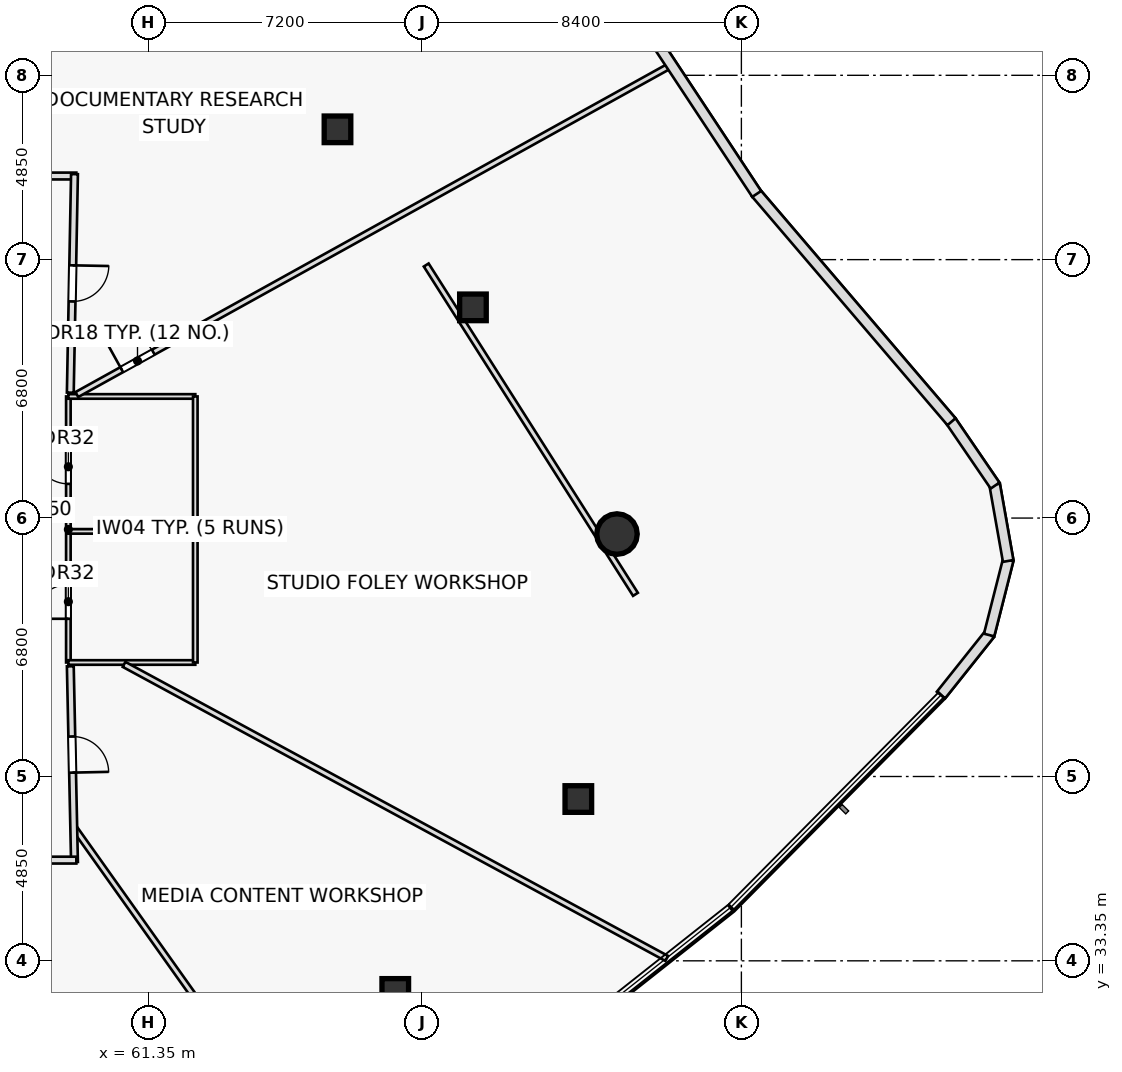
"""IFC4 building model, lengths in metres.
Left out: names, types, materials, properties, quantities, classifications, styles, units other than length and angle.
Written with IfcOpenShell. Run it as: python <this file> out.ifc"""

import sys

from ifc_helpers import new_model, si_unit, direction, frame, frame_2d, origin, origin_2d, place, context, subcontext, project, spatial, rectangle, hollow_rectangle, hollow_circle, extrude, element, fill, save


model = new_model("IFC4")
c1 = context("Model", 3, precision=1e-05, world=origin(), true_north=direction((0.0, 1.0)))
c2 = subcontext(c1, "Body", "Model", "MODEL_VIEW")
j1 = project(units=[si_unit("LENGTHUNIT", "METRE"), si_unit("PLANEANGLEUNIT", "RADIAN")], contexts=[c1])
p1 = place(None, origin())
s1 = spatial("IfcSite", under=j1, at=p1, CompositionType="ELEMENT")
p2 = place(p1, origin())
s2 = spatial("IfcBuilding", under=s1, at=p2, CompositionType="ELEMENT")
p3 = place(p2, frame((0.0, 0.0, 150.25)))
s3 = spatial("IfcBuildingStorey", under=s2, at=p3, CompositionType="ELEMENT", Elevation=150.25)
for number, where, z_axis, x_axis in (
    (1, (67.842, 32.532, 0.0), (0.0, 0.0, 1.0), (1.0, 0.0, 0.0)),
    (2, (72.659, 37.607, 0.0), (0.0, 0.0, 1.0), (1.0, 0.0, 0.0)),
):
    element("IfcColumn", number, at=place(p3, frame(where, z_axis=z_axis, x_axis=x_axis)), inside=s3, PredefinedType="COLUMN", context=c2, shape_type="SweptSolid", body=[
        extrude(hollow_rectangle(XDim=0.7, YDim=0.7, WallThickness=0.04, at=origin_2d()), origin(), (0.0, 0.0, 1.0), 3.55),
    ])
p4 = place(p3, frame((73.676, 44.58, 0.0), z_axis=(0.0, 0.0, 1.0), x_axis=(1.0, 0.0, 0.0)))
e3 = element("IfcColumn", 3, at=p4, inside=s3, PredefinedType="COLUMN", context=c2, shape_type="SweptSolid", body=[
    extrude(hollow_circle(Radius=0.533, WallThickness=0.045, at=origin_2d()), origin(), (0.0, 0.0, 1.0), 3.55),
])
for number, where, z_axis, x_axis in (
    (4, (69.886, 50.544, 0.0), (0.0, 0.0, 1.0), (1.0, 0.0, 0.0)),
    (5, (66.322, 55.229, 0.0), (0.0, 0.0, 1.0), (1.0, 0.0, 0.0)),
):
    element("IfcColumn", number, at=place(p3, frame(where, z_axis=z_axis, x_axis=x_axis)), inside=s3, PredefinedType="COLUMN", context=c2, shape_type="SweptSolid", body=[
        extrude(hollow_rectangle(XDim=0.7, YDim=0.7, WallThickness=0.04, at=origin_2d()), origin(), (0.0, 0.0, 1.0), 3.55),
    ])
p5 = place(p3, frame((74.163, 42.993, 0.0), z_axis=(0.0, 0.0, 1.0), x_axis=(-0.53628142437, 0.844039237166, 0.0)))
e6 = element("IfcWall", 6, at=p5, inside=s3, PredefinedType="PARTITIONING", context=c2, shape_type="SweptSolid", body=[
    extrude(rectangle(XDim=10.267, YDim=0.15, at=frame_2d((5.133, 0.0))), origin(), (0.0, 0.0, 1.0), 2.835),
])
p6 = place(p3, frame((59.24, 41.2, 0.0), z_axis=(0.0, 0.0, 1.0), x_axis=(0.0, 1.0, 0.0)))
e7 = element("IfcWall", 7, at=p6, inside=s3, PredefinedType="PARTITIONING", context=c2, shape_type="SweptSolid", body=[
    extrude(rectangle(XDim=7.0, YDim=0.12, at=frame_2d((3.5, 0.0))), origin(), (0.0, 0.0, 1.0), 3.55),
])
p7 = place(p6, frame((1.15, 0.0, 0.0)))
e8 = element("IfcOpeningElement", 8, at=p7, cuts=e7, PredefinedType="OPENING", context=c2, shape_type="SweptSolid", body=[
    extrude(rectangle(XDim=0.9, YDim=2.05, at=frame_2d((0.45, 1.025))), frame((0.0, 0.07, 0.0), z_axis=(0.0, -1.0, 0.0), x_axis=(1.0, 0.0, 0.0)), (0.0, 0.0, 1.0), 0.14),
])
p8 = place(p6, frame((4.7, 0.0, 0.0)))
e9 = element("IfcOpeningElement", 9, at=p8, cuts=e7, PredefinedType="OPENING", context=c2, shape_type="SweptSolid", body=[
    extrude(rectangle(XDim=0.9, YDim=2.05, at=frame_2d((0.45, 1.025))), frame((0.0, 0.07, 0.0), z_axis=(0.0, -1.0, 0.0), x_axis=(1.0, 0.0, 0.0)), (0.0, 0.0, 1.0), 0.14),
])
for number, where, z_axis, x_axis in (
    (10, (59.24, 41.2, 0.0), (0.0, 0.0, 1.0), (1.0, 0.0, 0.0)),
    (11, (59.24, 44.65, 0.0), (0.0, 0.0, 1.0), (1.0, 0.0, 0.0)),
    (12, (59.24, 48.2, 0.0), (0.0, 0.0, 1.0), (1.0, 0.0, 0.0)),
):
    element("IfcWall", number, at=place(p3, frame(where, z_axis=z_axis, x_axis=x_axis)), inside=s3, PredefinedType="PARTITIONING", context=c2, shape_type="SweptSolid", body=[
        extrude(rectangle(XDim=3.34, YDim=0.12, at=frame_2d((1.67, 0.0))), origin(), (0.0, 0.0, 1.0), 3.55),
    ])
p9 = place(p3, frame((62.58, 41.2, 0.0), z_axis=(0.0, 0.0, 1.0), x_axis=(0.0, 1.0, 0.0)))
e13 = element("IfcWall", 13, at=p9, inside=s3, PredefinedType="PARTITIONING", context=c2, shape_type="SweptSolid", body=[
    extrude(rectangle(XDim=7.0, YDim=0.12, at=frame_2d((3.5, 0.0))), origin(), (0.0, 0.0, 1.0), 3.55),
])
p10 = place(p3, frame((59.463, 48.25, 0.0), z_axis=(0.0, 0.0, 1.0), x_axis=(0.87461815062, 0.48481242827, 0.0)))
e14 = element("IfcWall", 14, at=p10, inside=s3, PredefinedType="PARTITIONING", context=c2, shape_type="SweptSolid", body=[
    extrude(rectangle(XDim=17.901, YDim=0.15, at=frame_2d((8.95, 0.0))), origin(), (0.0, 0.0, 1.0), 2.835),
])
p11 = place(p10, frame((1.35, 0.0, 0.0)))
e15 = element("IfcOpeningElement", 15, at=p11, cuts=e14, PredefinedType="OPENING", context=c2, shape_type="SweptSolid", body=[
    extrude(rectangle(XDim=0.95, YDim=2.05, at=frame_2d((0.475, 1.025))), frame((0.0, 0.085, 0.0), z_axis=(0.0, -1.0, 0.0), x_axis=(1.0, 0.0, 0.0)), (0.0, 0.0, 1.0), 0.17),
])
p12 = place(p3, frame((56.874, 54.0, 0.0), z_axis=(0.0, 0.0, 1.0), x_axis=(0.341852479972, 0.939753628318, 0.0)))
e16 = element("IfcWall", 16, at=p12, inside=s3, PredefinedType="PARTITIONING", context=c2, shape_type="SweptSolid", body=[
    extrude(rectangle(XDim=14.511, YDim=0.15, at=frame_2d((7.256, 0.0))), origin(), (0.0, 0.0, 1.0), 2.835),
])
p13 = place(p3, frame((56.625, 36.0, 0.0), z_axis=(0.0, 0.0, 1.0), x_axis=(0.318583516761, -0.947894795243, 0.0)))
e17 = element("IfcWall", 17, at=p13, inside=s3, PredefinedType="PARTITIONING", context=c2, shape_type="SweptSolid", body=[
    extrude(rectangle(XDim=12.338, YDim=0.15, at=frame_2d((6.169, 0.0))), origin(), (0.0, 0.0, 1.0), 2.835),
])
p14 = place(p3, frame((59.381, 36.869, 0.0), z_axis=(0.0, 0.0, 1.0), x_axis=(0.579466969075, -0.814995724989, 0.0)))
e18 = element("IfcWall", 18, at=p14, inside=s3, PredefinedType="PARTITIONING", context=c2, shape_type="SweptSolid", body=[
    extrude(rectangle(XDim=11.796, YDim=0.15, at=frame_2d((5.898, 0.0))), origin(), (0.0, 0.0, 1.0), 2.975),
])
p15 = place(p3, frame((60.706, 41.15, 0.0), z_axis=(0.0, 0.0, 1.0), x_axis=(0.879232941784, -0.476392101195, 0.0)))
e19 = element("IfcWall", 19, at=p15, inside=s3, PredefinedType="PARTITIONING", context=c2, shape_type="SweptSolid", body=[
    extrude(rectangle(XDim=16.241, YDim=0.15, at=frame_2d((8.121, 0.0))), origin(), (0.0, 0.0, 1.0), 2.835),
])
p16 = place(p3, frame((54.3, 54.0, 0.0), z_axis=(0.0, 0.0, 1.0), x_axis=(1.0, 0.0, 0.0)))
e20 = element("IfcWall", 20, at=p16, inside=s3, PredefinedType="PARTITIONING", context=c2, shape_type="SweptSolid", body=[
    extrude(rectangle(XDim=5.15, YDim=0.18, at=frame_2d((2.575, 0.0))), origin(), (0.0, 0.0, 1.0), 2.835),
])
p17 = place(p16, frame((1.033, 0.0, 0.0)))
e21 = element("IfcOpeningElement", 21, at=p17, cuts=e20, PredefinedType="OPENING", context=c2, shape_type="SweptSolid", body=[
    extrude(rectangle(XDim=0.95, YDim=2.05, at=frame_2d((0.475, 1.025))), frame((0.0, 0.1, 0.0), z_axis=(0.0, -1.0, 0.0), x_axis=(1.0, 0.0, 0.0)), (0.0, 0.0, 1.0), 0.2),
])
p18 = place(p3, frame((59.401, 54.05, 0.0), z_axis=(0.0, 0.0, 1.0), x_axis=(-0.019103170983, -0.999817517779, 0.0)))
e22 = element("IfcWall", 22, at=p18, inside=s3, PredefinedType="PARTITIONING", context=c2, shape_type="SweptSolid", body=[
    extrude(rectangle(XDim=5.751, YDim=0.18, at=frame_2d((2.875, 0.0))), origin(), (0.0, 0.0, 1.0), 2.835),
])
p19 = place(p18, frame((2.4, 0.0, 0.0)))
e23 = element("IfcOpeningElement", 23, at=p19, cuts=e22, PredefinedType="OPENING", context=c2, shape_type="SweptSolid", body=[
    extrude(rectangle(XDim=0.95, YDim=2.05, at=frame_2d((0.475, 1.025))), frame((0.0, 0.1, 0.0), z_axis=(0.0, -1.0, 0.0), x_axis=(1.0, 0.0, 0.0)), (0.0, 0.0, 1.0), 0.2),
])
p20 = place(p3, frame((59.291, 41.1, 0.0), z_axis=(0.0, 0.0, 1.0), x_axis=(0.021374589398, -0.999771537366, 0.0)))
e24 = element("IfcWall", 24, at=p20, inside=s3, PredefinedType="PARTITIONING", context=c2, shape_type="SweptSolid", body=[
    extrude(rectangle(XDim=5.151, YDim=0.18, at=frame_2d((2.576, 0.0))), origin(), (0.0, 0.0, 1.0), 2.835),
])
p21 = place(p20, frame((1.849, 0.0, 0.0)))
e25 = element("IfcOpeningElement", 25, at=p21, cuts=e24, PredefinedType="OPENING", context=c2, shape_type="SweptSolid", body=[
    extrude(rectangle(XDim=0.95, YDim=2.05, at=frame_2d((0.475, 1.025))), frame((0.0, 0.1, 0.0), z_axis=(0.0, -1.0, 0.0), x_axis=(1.0, 0.0, 0.0)), (0.0, 0.0, 1.0), 0.2),
])
p22 = place(p3, frame((59.45, 36.0, 0.0), z_axis=(0.0, 0.0, 1.0), x_axis=(-1.0, 0.0, 0.0)))
e26 = element("IfcWall", 26, at=p22, inside=s3, PredefinedType="PARTITIONING", context=c2, shape_type="SweptSolid", body=[
    extrude(rectangle(XDim=19.7, YDim=0.18, at=frame_2d((9.85, 0.0))), origin(), (0.0, 0.0, 1.0), 2.835),
])
p23 = place(p22, frame((1.035, 0.0, 0.0)))
e27 = element("IfcOpeningElement", 27, at=p23, cuts=e26, PredefinedType="OPENING", context=c2, shape_type="SweptSolid", body=[
    extrude(rectangle(XDim=0.95, YDim=2.05, at=frame_2d((0.475, 1.025))), frame((0.0, 0.1, 0.0), z_axis=(0.0, -1.0, 0.0), x_axis=(1.0, 0.0, 0.0)), (0.0, 0.0, 1.0), 0.2),
])
p24 = place(p22, frame((5.885, 0.0, 0.0)))
e28 = element("IfcOpeningElement", 28, at=p24, cuts=e26, PredefinedType="OPENING", context=c2, shape_type="SweptSolid", body=[
    extrude(rectangle(XDim=0.95, YDim=2.05, at=frame_2d((0.475, 1.025))), frame((0.0, 0.1, 0.0), z_axis=(0.0, -1.0, 0.0), x_axis=(1.0, 0.0, 0.0)), (0.0, 0.0, 1.0), 0.2),
])
p25 = place(p22, frame((10.567, 0.0, 0.0)))
e29 = element("IfcOpeningElement", 29, at=p25, cuts=e26, PredefinedType="OPENING", context=c2, shape_type="SweptSolid", body=[
    extrude(rectangle(XDim=0.95, YDim=2.05, at=frame_2d((0.475, 1.025))), frame((0.0, 0.1, 0.0), z_axis=(0.0, -1.0, 0.0), x_axis=(1.0, 0.0, 0.0)), (0.0, 0.0, 1.0), 0.2),
])
p26 = place(p22, frame((15.343, 0.0, 0.0)))
e30 = element("IfcOpeningElement", 30, at=p26, cuts=e26, PredefinedType="OPENING", context=c2, shape_type="SweptSolid", body=[
    extrude(rectangle(XDim=0.95, YDim=2.05, at=frame_2d((0.475, 1.025))), frame((0.0, 0.1, 0.0), z_axis=(0.0, -1.0, 0.0), x_axis=(1.0, 0.0, 0.0)), (0.0, 0.0, 1.0), 0.2),
])
p27 = place(p3, frame((82.203, 40.343, 0.0), z_axis=(0.0, 0.0, 1.0), x_axis=(0.623127560827, 0.782120222816, 0.0)))
e31 = element("IfcWall", 31, at=p27, inside=s3, PredefinedType="STANDARD", context=c2, shape_type="SweptSolid", body=[
    extrude(rectangle(XDim=2.053, YDim=0.28, at=frame_2d((1.026, 0.0))), origin(), (0.0, 0.0, 1.0), 3.55),
])
p28 = place(p3, frame((83.469, 41.922, 0.0), z_axis=(0.0, 0.0, 1.0), x_axis=(0.246136012323, 0.969235298283, 0.0)))
e32 = element("IfcWall", 32, at=p28, inside=s3, PredefinedType="STANDARD", context=c2, shape_type="SweptSolid", body=[
    extrude(rectangle(XDim=2.041, YDim=0.28, at=frame_2d((1.021, 0.0))), origin(), (0.0, 0.0, 1.0), 3.55),
])
p29 = place(p3, frame((83.97, 43.872, 0.0), z_axis=(0.0, 0.0, 1.0), x_axis=(-0.17447430883, 0.984661726462, 0.0)))
e33 = element("IfcWall", 33, at=p29, inside=s3, PredefinedType="STANDARD", context=c2, shape_type="SweptSolid", body=[
    extrude(rectangle(XDim=2.042, YDim=0.28, at=frame_2d((1.021, 0.0))), origin(), (0.0, 0.0, 1.0), 3.55),
])
p30 = place(p3, frame((83.625, 45.854, 0.0), z_axis=(0.0, 0.0, 1.0), x_axis=(-0.564217382492, 0.82562627459, 0.0)))
e34 = element("IfcWall", 34, at=p30, inside=s3, PredefinedType="STANDARD", context=c2, shape_type="SweptSolid", body=[
    extrude(rectangle(XDim=2.064, YDim=0.28, at=frame_2d((1.032, 0.0))), origin(), (0.0, 0.0, 1.0), 3.55),
])
p31 = place(p3, frame((82.479, 47.535, 0.0), z_axis=(0.0, 0.0, 1.0), x_axis=(-0.649762180693, 0.76013755896, 0.0)))
e35 = element("IfcWall", 35, at=p31, inside=s3, PredefinedType="STANDARD", context=c2, shape_type="SweptSolid", body=[
    extrude(rectangle(XDim=7.917, YDim=0.28, at=frame_2d((3.958, 0.0))), origin(), (0.0, 0.0, 1.0), 3.55),
])
p32 = place(p3, frame((77.353, 53.529, 0.0), z_axis=(0.0, 0.0, 1.0), x_axis=(-0.551124772076, 0.834422845807, 0.0)))
e36 = element("IfcWall", 36, at=p32, inside=s3, PredefinedType="STANDARD", context=c2, shape_type="SweptSolid", body=[
    extrude(rectangle(XDim=8.521, YDim=0.28, at=frame_2d((4.261, 0.0))), origin(), (0.0, 0.0, 1.0), 3.55),
])
p33 = place(p7, origin())
e37 = element("IfcDoor", 37, at=p33, inside=s3, OperationType="SINGLE_SWING_LEFT", PredefinedType="DOOR", context=c2, shape_type="SweptSolid", body=[
    extrude(rectangle(XDim=0.9, YDim=2.05, at=frame_2d((0.45, 1.025))), frame((0.0, 0.025, 0.0), z_axis=(0.0, -1.0, 0.0), x_axis=(1.0, 0.0, 0.0)), (0.0, 0.0, 1.0), 0.05),
])
fill(e8, e37)
p34 = place(p8, origin())
e38 = element("IfcDoor", 38, at=p34, inside=s3, OperationType="SINGLE_SWING_RIGHT", PredefinedType="DOOR", context=c2, shape_type="SweptSolid", body=[
    extrude(rectangle(XDim=0.9, YDim=2.05, at=frame_2d((0.45, 1.025))), frame((0.0, 0.025, 0.0), z_axis=(0.0, -1.0, 0.0), x_axis=(1.0, 0.0, 0.0)), (0.0, 0.0, 1.0), 0.05),
])
fill(e9, e38)
p35 = place(p11, origin())
e39 = element("IfcDoor", 39, at=p35, inside=s3, OperationType="SINGLE_SWING_LEFT", PredefinedType="DOOR", context=c2, shape_type="SweptSolid", body=[
    extrude(rectangle(XDim=0.95, YDim=2.05, at=frame_2d((0.475, 1.025))), frame((0.0, 0.025, 0.0), z_axis=(0.0, -1.0, 0.0), x_axis=(1.0, 0.0, 0.0)), (0.0, 0.0, 1.0), 0.05),
])
fill(e15, e39)
p36 = place(p19, origin())
e40 = element("IfcDoor", 40, at=p36, inside=s3, OperationType="SINGLE_SWING_LEFT", PredefinedType="DOOR", context=c2, shape_type="SweptSolid", body=[
    extrude(rectangle(XDim=0.95, YDim=2.05, at=frame_2d((0.475, 1.025))), frame((0.0, 0.025, 0.0), z_axis=(0.0, -1.0, 0.0), x_axis=(1.0, 0.0, 0.0)), (0.0, 0.0, 1.0), 0.05),
])
fill(e23, e40)
p37 = place(p21, origin())
e41 = element("IfcDoor", 41, at=p37, inside=s3, OperationType="SINGLE_SWING_RIGHT", PredefinedType="DOOR", context=c2, shape_type="SweptSolid", body=[
    extrude(rectangle(XDim=0.95, YDim=2.05, at=frame_2d((0.475, 1.025))), frame((0.0, 0.025, 0.0), z_axis=(0.0, -1.0, 0.0), x_axis=(1.0, 0.0, 0.0)), (0.0, 0.0, 1.0), 0.05),
])
fill(e25, e41)
save(model, sys.argv[1])
